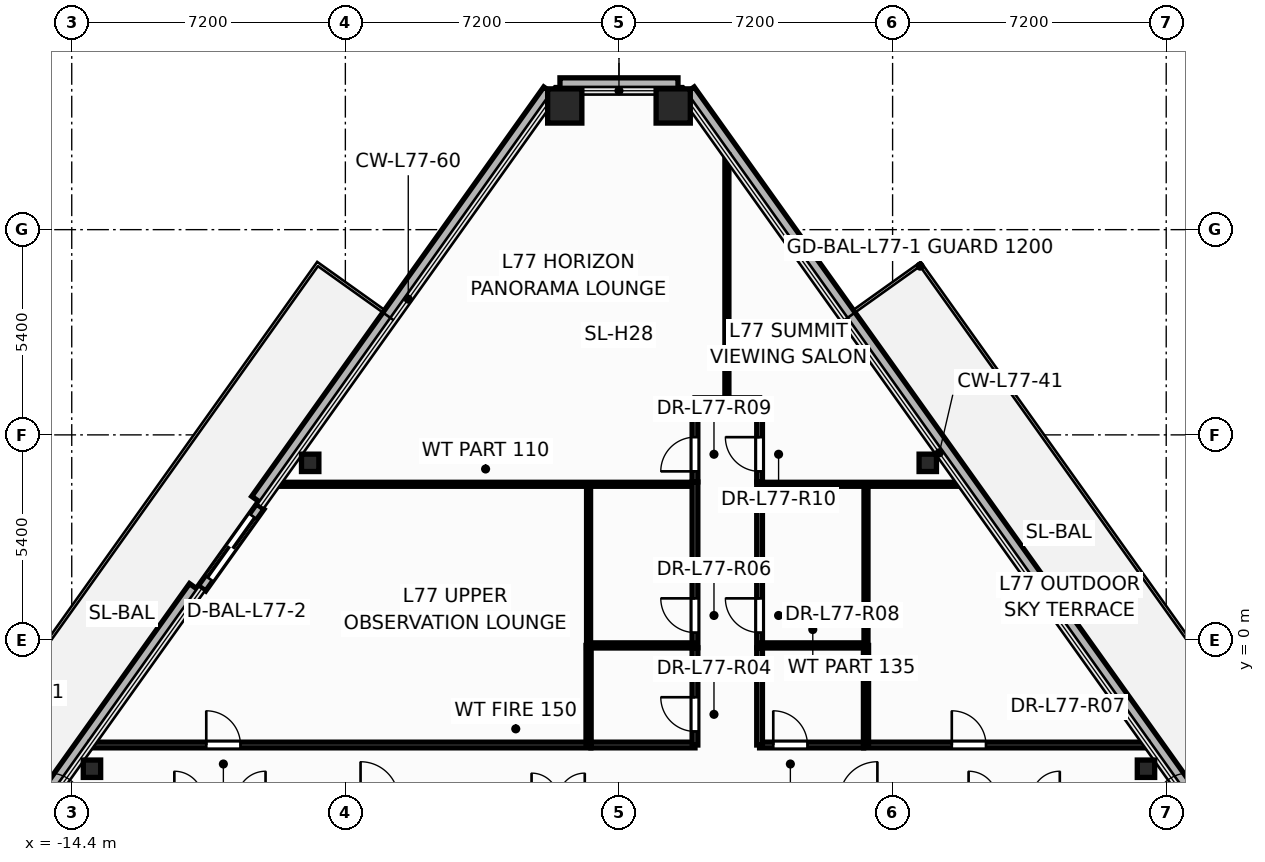
"""IFC4 building model, lengths in metres.
Left out: names, types, materials, properties, quantities, classifications, styles, units other than length and angle.
Written with IfcOpenShell. Run it as: python <this file> out.ifc"""

import sys

from ifc_helpers import new_model, si_unit, direction, frame, frame_2d, origin, origin_2d, place, context, subcontext, project, spatial, rectangle, hollow_rectangle, hollow_circle, extrude, element, fill, save


model = new_model("IFC4")
c1 = context("Model", 3, precision=1e-05, world=origin(), true_north=direction((0.0, 1.0)))
c2 = subcontext(c1, "Body", "Model", "MODEL_VIEW")
j1 = project(units=[si_unit("LENGTHUNIT", "METRE"), si_unit("PLANEANGLEUNIT", "RADIAN")], contexts=[c1])
p1 = place(None, origin())
s1 = spatial("IfcSite", under=j1, at=p1, CompositionType="ELEMENT")
p2 = place(p1, origin())
s2 = spatial("IfcBuilding", under=s1, at=p2, CompositionType="ELEMENT")
p3 = place(p2, frame((0.0, 0.0, 293.4)))
s3 = spatial("IfcBuildingStorey", under=s2, at=p3, CompositionType="ELEMENT", Elevation=293.4)
for number, where, z_axis, x_axis in (
    (1, (1.427, 14.055, 0.0), (0.0, 0.0, 1.0), (1.0, 0.0, 0.0)),
    (2, (-1.427, 14.055, 0.0), (0.0, 0.0, 1.0), (1.0, 0.0, 0.0)),
):
    element("IfcColumn", number, at=place(p3, frame(where, z_axis=z_axis, x_axis=x_axis)), inside=s3, PredefinedType="COLUMN", context=c2, shape_type="SweptSolid", body=[
        extrude(hollow_rectangle(XDim=0.9, YDim=0.9, WallThickness=0.04, at=origin_2d()), origin(), (0.0, 0.0, 1.0), 4.2),
    ])
for number, where, z_axis, x_axis in (
    (3, (13.868, -3.385, 0.0), (0.0, 0.0, 1.0), (1.0, 0.0, 0.0)),
    (4, (8.126, 4.664, 0.0), (0.0, 0.0, 1.0), (1.0, 0.0, 0.0)),
    (5, (-8.126, 4.664, 0.0), (0.0, 0.0, 1.0), (1.0, 0.0, 0.0)),
    (6, (-13.868, -3.385, 0.0), (0.0, 0.0, 1.0), (1.0, 0.0, 0.0)),
):
    element("IfcColumn", number, at=place(p3, frame(where, z_axis=z_axis, x_axis=x_axis)), inside=s3, PredefinedType="COLUMN", context=c2, shape_type="SweptSolid", body=[
        extrude(hollow_circle(Radius=0.229, WallThickness=0.016, at=origin_2d()), origin(), (0.0, 0.0, 1.0), 4.2),
    ])
p4 = place(p3, frame((15.285, -4.406, -0.2), z_axis=(0.0, 0.0, 1.0), x_axis=(-0.580762496963, 0.814073044709, 0.0)))
e7 = element("IfcWall", 7, at=p4, inside=s3, PredefinedType="PARAPET", context=c2, shape_type="SweptSolid", body=[
    extrude(rectangle(XDim=23.163, YDim=0.36, at=frame_2d((11.581, 0.0))), origin(), (0.0, 0.0, 1.0), 0.38),
])
p5 = place(p3, frame((1.553, 14.615, -0.2), z_axis=(0.0, 0.0, 1.0), x_axis=(-1.0, 0.0, 0.0)))
e8 = element("IfcWall", 8, at=p5, inside=s3, PredefinedType="PARAPET", context=c2, shape_type="SweptSolid", body=[
    extrude(rectangle(XDim=3.105, YDim=0.36, at=frame_2d((1.553, 0.0))), origin(), (0.0, 0.0, 1.0), 0.38),
])
p6 = place(p3, frame((-1.833, 14.45, -0.2), z_axis=(0.0, 0.0, 1.0), x_axis=(-0.58075810662, -0.814076176777, 0.0)))
e9 = element("IfcWall", 9, at=p6, inside=s3, PredefinedType="PARAPET", context=c2, shape_type="SweptSolid", body=[
    extrude(rectangle(XDim=13.231, YDim=0.36, at=frame_2d((6.616, 0.0))), origin(), (0.0, 0.0, 1.0), 0.38),
])
p7 = place(p3, frame((-11.155, 1.383, -0.2), z_axis=(0.0, 0.0, 1.0), x_axis=(-0.580765612452, -0.814070822099, 0.0)))
e10 = element("IfcWall", 10, at=p7, inside=s3, PredefinedType="PARAPET", context=c2, shape_type="SweptSolid", body=[
    extrude(rectangle(XDim=17.156, YDim=0.36, at=frame_2d((8.578, 0.0))), origin(), (0.0, 0.0, 1.0), 0.38),
])
p8 = place(p3, frame((-9.439, 3.512, -0.015), z_axis=(0.0, 0.0, 1.0), x_axis=(-0.580756960622, -0.814076994325, 0.0)))
e11 = element("IfcWall", 11, at=p8, inside=s3, PredefinedType="STANDARD", context=c2, shape_type="SweptSolid", body=[
    extrude(rectangle(XDim=2.64, YDim=0.24, at=frame_2d((1.32, 0.0))), origin(), (0.0, 0.0, 1.0), 3.413),
])
p9 = place(p8, frame((0.32, 0.0, 0.015)))
e12 = element("IfcOpeningElement", 12, at=p9, cuts=e11, PredefinedType="OPENING", context=c2, shape_type="SweptSolid", body=[
    extrude(rectangle(XDim=2.006, YDim=2.204, at=frame_2d((1.0, 1.102))), frame((0.0, 0.13, 0.0), z_axis=(0.0, -1.0, 0.0), x_axis=(1.0, 0.0, 0.0)), (0.0, 0.0, 1.0), 0.26),
])
p10 = place(p3, frame((-13.914, -2.76, 0.0), z_axis=(0.0, 0.0, 1.0), x_axis=(1.0, 0.0, 0.0)))
e13 = element("IfcWall", 13, at=p10, inside=s3, PredefinedType="PARTITIONING", context=c2, shape_type="SweptSolid", body=[
    extrude(rectangle(XDim=13.174, YDim=0.15, at=frame_2d((6.587, 0.0))), origin(), (0.0, 0.0, 1.0), 2.855),
])
p11 = place(p10, frame((3.053, 0.0, 0.0)))
e14 = element("IfcOpeningElement", 14, at=p11, cuts=e13, PredefinedType="OPENING", context=c2, shape_type="SweptSolid", body=[
    extrude(rectangle(XDim=0.906, YDim=2.104, at=frame_2d((0.45, 1.052))), frame((0.0, 0.085, 0.0), z_axis=(0.0, -1.0, 0.0), x_axis=(1.0, 0.0, 0.0)), (0.0, 0.0, 1.0), 0.17),
])
p12 = place(p3, frame((-9.02, 4.1, 0.0), z_axis=(0.0, 0.0, 1.0), x_axis=(1.0, 0.0, 0.0)))
e15 = element("IfcWall", 15, at=p12, inside=s3, PredefinedType="PARTITIONING", context=c2, shape_type="SweptSolid", body=[
    extrude(rectangle(XDim=11.02, YDim=0.105, at=frame_2d((5.51, 0.0))), origin(), (0.0, 0.0, 1.0), 2.855),
])
p13 = place(p3, frame((6.44, -2.76, 0.0), z_axis=(0.0, 0.0, 1.0), x_axis=(1.0, 0.0, 0.0)))
e16 = element("IfcWall", 16, at=p13, inside=s3, PredefinedType="PARTITIONING", context=c2, shape_type="SweptSolid", body=[
    extrude(rectangle(XDim=7.474, YDim=0.15, at=frame_2d((3.737, 0.0))), origin(), (0.0, 0.0, 1.0), 2.855),
])
p14 = place(p13, frame((2.318, 0.0, 0.0)))
e17 = element("IfcOpeningElement", 17, at=p14, cuts=e16, PredefinedType="OPENING", context=c2, shape_type="SweptSolid", body=[
    extrude(rectangle(XDim=0.906, YDim=2.104, at=frame_2d((0.45, 1.052))), frame((0.0, 0.085, 0.0), z_axis=(0.0, -1.0, 0.0), x_axis=(1.0, 0.0, 0.0)), (0.0, 0.0, 1.0), 0.17),
])
p15 = place(p3, frame((2.84, 6.3, 0.0), z_axis=(0.0, 0.0, 1.0), x_axis=(0.0, 1.0, 0.0)))
e18 = element("IfcWall", 18, at=p15, inside=s3, PredefinedType="PARTITIONING", context=c2, shape_type="SweptSolid", body=[
    extrude(rectangle(XDim=6.462, YDim=0.105, at=frame_2d((3.231, 0.0))), origin(), (0.0, 0.0, 1.0), 2.855),
])
p16 = place(p3, frame((2.0, -0.2, 0.0), z_axis=(0.0, 0.0, 1.0), x_axis=(0.0, 1.0, 0.0)))
e19 = element("IfcWall", 19, at=p16, inside=s3, PredefinedType="PARTITIONING", context=c2, shape_type="SweptSolid", body=[
    extrude(rectangle(XDim=4.36, YDim=0.15, at=frame_2d((2.18, 0.0))), origin(), (0.0, 0.0, 1.0), 3.88),
])
p17 = place(p16, frame((0.398, 0.0, 0.0)))
e20 = element("IfcOpeningElement", 20, at=p17, cuts=e19, PredefinedType="OPENING", context=c2, shape_type="SweptSolid", body=[
    extrude(rectangle(XDim=0.906, YDim=2.104, at=frame_2d((0.45, 1.052))), frame((0.0, 0.085, 0.0), z_axis=(0.0, -1.0, 0.0), x_axis=(1.0, 0.0, 0.0)), (0.0, 0.0, 1.0), 0.17),
])
p18 = place(p3, frame((3.7, -0.2, 0.0), z_axis=(0.0, 0.0, 1.0), x_axis=(0.0, 1.0, 0.0)))
e21 = element("IfcWall", 21, at=p18, inside=s3, PredefinedType="PARTITIONING", context=c2, shape_type="SweptSolid", body=[
    extrude(rectangle(XDim=4.36, YDim=0.15, at=frame_2d((2.18, 0.0))), origin(), (0.0, 0.0, 1.0), 2.855),
])
p19 = place(p18, frame((0.398, 0.0, 0.0)))
e22 = element("IfcOpeningElement", 22, at=p19, cuts=e21, PredefinedType="OPENING", context=c2, shape_type="SweptSolid", body=[
    extrude(rectangle(XDim=0.906, YDim=2.104, at=frame_2d((0.45, 1.052))), frame((0.0, 0.085, 0.0), z_axis=(0.0, -1.0, 0.0), x_axis=(1.0, 0.0, 0.0)), (0.0, 0.0, 1.0), 0.17),
])
for number, where, z_axis, x_axis in (
    (23, (-0.8, -0.2, 0.0), (0.0, 0.0, 1.0), (0.0, 1.0, 0.0)),
    (24, (6.5, -0.2, 0.0), (0.0, 0.0, 1.0), (0.0, 1.0, 0.0)),
):
    element("IfcWall", number, at=place(p3, frame(where, z_axis=z_axis, x_axis=x_axis)), inside=s3, PredefinedType="PARTITIONING", context=c2, shape_type="SweptSolid", body=[
        extrude(rectangle(XDim=4.3, YDim=0.105, at=frame_2d((2.15, 0.0))), origin(), (0.0, 0.0, 1.0), 2.855),
    ])
p20 = place(p3, frame((-0.738, -2.76, 0.0), z_axis=(0.0, 0.0, 1.0), x_axis=(1.0, 0.0, 0.0)))
e25 = element("IfcWall", 25, at=p20, inside=s3, PredefinedType="PARTITIONING", context=c2, shape_type="SweptSolid", body=[
    extrude(rectangle(XDim=2.738, YDim=0.15, at=frame_2d((1.369, 0.0))), origin(), (0.0, 0.0, 1.0), 2.855),
])
p21 = place(p3, frame((3.7, -2.76, 0.0), z_axis=(0.0, 0.0, 1.0), x_axis=(1.0, 0.0, 0.0)))
e26 = element("IfcWall", 26, at=p21, inside=s3, PredefinedType="PARTITIONING", context=c2, shape_type="SweptSolid", body=[
    extrude(rectangle(XDim=2.738, YDim=0.15, at=frame_2d((1.369, 0.0))), origin(), (0.0, 0.0, 1.0), 3.88),
])
p22 = place(p21, frame((0.36, 0.0, 0.0)))
e27 = element("IfcOpeningElement", 27, at=p22, cuts=e26, PredefinedType="OPENING", context=c2, shape_type="SweptSolid", body=[
    extrude(rectangle(XDim=0.906, YDim=2.104, at=frame_2d((0.45, 1.052))), frame((0.0, 0.085, 0.0), z_axis=(0.0, -1.0, 0.0), x_axis=(1.0, 0.0, 0.0)), (0.0, 0.0, 1.0), 0.17),
])
for number, where, z_axis, x_axis in (
    (28, (3.7, -0.14, 0.0), (0.0, 0.0, 1.0), (1.0, 0.0, 0.0)),
    (29, (-0.8, -0.14, 0.0), (0.0, 0.0, 1.0), (1.0, 0.0, 0.0)),
):
    element("IfcWall", number, at=place(p3, frame(where, z_axis=z_axis, x_axis=x_axis)), inside=s3, PredefinedType="PARTITIONING", context=c2, shape_type="SweptSolid", body=[
        extrude(rectangle(XDim=2.8, YDim=0.135, at=frame_2d((1.4, 0.0))), origin(), (0.0, 0.0, 1.0), 2.855),
    ])
p23 = place(p3, frame((3.7, 4.1, 0.0), z_axis=(0.0, 0.0, 1.0), x_axis=(1.0, 0.0, 0.0)))
e30 = element("IfcWall", 30, at=p23, inside=s3, PredefinedType="PARTITIONING", context=c2, shape_type="SweptSolid", body=[
    extrude(rectangle(XDim=5.32, YDim=0.105, at=frame_2d((2.66, 0.0))), origin(), (0.0, 0.0, 1.0), 2.855),
])
p24 = place(p3, frame((3.7, -2.76, 0.0), z_axis=(0.0, 0.0, 1.0), x_axis=(0.0, 1.0, 0.0)))
e31 = element("IfcWall", 31, at=p24, inside=s3, PredefinedType="PARTITIONING", context=c2, shape_type="SweptSolid", body=[
    extrude(rectangle(XDim=2.558, YDim=0.15, at=frame_2d((1.279, 0.0))), origin(), (0.0, 0.0, 1.0), 2.855),
])
p25 = place(p3, frame((2.0, -2.76, 0.0), z_axis=(0.0, 0.0, 1.0), x_axis=(0.0, 1.0, 0.0)))
e32 = element("IfcWall", 32, at=p25, inside=s3, PredefinedType="PARTITIONING", context=c2, shape_type="SweptSolid", body=[
    extrude(rectangle(XDim=2.558, YDim=0.15, at=frame_2d((1.279, 0.0))), origin(), (0.0, 0.0, 1.0), 2.855),
])
p26 = place(p25, frame((0.357, 0.0, 0.0)))
e33 = element("IfcOpeningElement", 33, at=p26, cuts=e32, PredefinedType="OPENING", context=c2, shape_type="SweptSolid", body=[
    extrude(rectangle(XDim=0.906, YDim=2.104, at=frame_2d((0.45, 1.052))), frame((0.0, 0.085, 0.0), z_axis=(0.0, -1.0, 0.0), x_axis=(1.0, 0.0, 0.0)), (0.0, 0.0, 1.0), 0.17),
])
p27 = place(p3, frame((6.5, -2.76, 0.0), z_axis=(0.0, 0.0, 1.0), x_axis=(0.0, 1.0, 0.0)))
e34 = element("IfcWall", 34, at=p27, inside=s3, PredefinedType="PARTITIONING", context=c2, shape_type="SweptSolid", body=[
    extrude(rectangle(XDim=2.62, YDim=0.135, at=frame_2d((1.31, 0.0))), origin(), (0.0, 0.0, 1.0), 2.855),
])
p28 = place(p3, frame((-0.8, -2.76, 0.0), z_axis=(0.0, 0.0, 1.0), x_axis=(0.0, 1.0, 0.0)))
e35 = element("IfcWall", 35, at=p28, inside=s3, PredefinedType="PARTITIONING", context=c2, shape_type="SweptSolid", body=[
    extrude(rectangle(XDim=2.62, YDim=0.135, at=frame_2d((1.31, 0.0))), origin(), (0.0, 0.0, 1.0), 3.88),
])
p29 = place(p3, frame((2.0, 4.162, 0.0), z_axis=(0.0, 0.0, 1.0), x_axis=(0.0, 1.0, 0.0)))
e36 = element("IfcWall", 36, at=p29, inside=s3, PredefinedType="PARTITIONING", context=c2, shape_type="SweptSolid", body=[
    extrude(rectangle(XDim=2.138, YDim=0.15, at=frame_2d((1.069, 0.0))), origin(), (0.0, 0.0, 1.0), 2.855),
])
p30 = place(p29, frame((0.278, 0.0, 0.0)))
e37 = element("IfcOpeningElement", 37, at=p30, cuts=e36, PredefinedType="OPENING", context=c2, shape_type="SweptSolid", body=[
    extrude(rectangle(XDim=0.906, YDim=2.104, at=frame_2d((0.45, 1.052))), frame((0.0, 0.085, 0.0), z_axis=(0.0, -1.0, 0.0), x_axis=(1.0, 0.0, 0.0)), (0.0, 0.0, 1.0), 0.17),
])
p31 = place(p3, frame((3.7, 4.162, 0.0), z_axis=(0.0, 0.0, 1.0), x_axis=(0.0, 1.0, 0.0)))
e38 = element("IfcWall", 38, at=p31, inside=s3, PredefinedType="PARTITIONING", context=c2, shape_type="SweptSolid", body=[
    extrude(rectangle(XDim=2.138, YDim=0.15, at=frame_2d((1.069, 0.0))), origin(), (0.0, 0.0, 1.0), 2.855),
])
p32 = place(p31, frame((0.278, 0.0, 0.0)))
e39 = element("IfcOpeningElement", 39, at=p32, cuts=e38, PredefinedType="OPENING", context=c2, shape_type="SweptSolid", body=[
    extrude(rectangle(XDim=0.906, YDim=2.104, at=frame_2d((0.45, 1.052))), frame((0.0, 0.085, 0.0), z_axis=(0.0, -1.0, 0.0), x_axis=(1.0, 0.0, 0.0)), (0.0, 0.0, 1.0), 0.17),
])
p33 = place(p3, frame((2.0, 6.3, 0.0), z_axis=(0.0, 0.0, 1.0), x_axis=(1.0, 0.0, 0.0)))
e40 = element("IfcWall", 40, at=p33, inside=s3, PredefinedType="PARTITIONING", context=c2, shape_type="SweptSolid", body=[
    extrude(rectangle(XDim=1.7, YDim=0.15, at=frame_2d((0.85, 0.0))), origin(), (0.0, 0.0, 1.0), 2.855),
])
p34 = place(p9, origin())
e41 = element("IfcDoor", 41, at=p34, inside=s3, OperationType="DOUBLE_DOOR_SLIDING", PredefinedType="DOOR", context=c2, shape_type="SweptSolid", body=[
    extrude(rectangle(XDim=2.0, YDim=2.2, at=frame_2d((1.0, 1.1))), frame((0.0, 0.025, 0.0), z_axis=(0.0, -1.0, 0.0), x_axis=(1.0, 0.0, 0.0)), (0.0, 0.0, 1.0), 0.05),
])
fill(e12, e41)
p35 = place(p22, origin())
e42 = element("IfcDoor", 42, at=p35, inside=s3, OperationType="SINGLE_SWING_LEFT", PredefinedType="DOOR", context=c2, shape_type="SweptSolid", body=[
    extrude(rectangle(XDim=0.9, YDim=2.1, at=frame_2d((0.45, 1.05))), frame((0.0, 0.025, 0.0), z_axis=(0.0, -1.0, 0.0), x_axis=(1.0, 0.0, 0.0)), (0.0, 0.0, 1.0), 0.05),
])
fill(e27, e42)
p36 = place(p26, origin())
e43 = element("IfcDoor", 43, at=p36, inside=s3, OperationType="SINGLE_SWING_RIGHT", PredefinedType="DOOR", context=c2, shape_type="SweptSolid", body=[
    extrude(rectangle(XDim=0.9, YDim=2.1, at=frame_2d((0.45, 1.05))), frame((0.0, 0.025, 0.0), z_axis=(0.0, -1.0, 0.0), x_axis=(1.0, 0.0, 0.0)), (0.0, 0.0, 1.0), 0.05),
])
fill(e33, e43)
p37 = place(p11, origin())
e44 = element("IfcDoor", 44, at=p37, inside=s3, OperationType="SINGLE_SWING_LEFT", PredefinedType="DOOR", context=c2, shape_type="SweptSolid", body=[
    extrude(rectangle(XDim=0.9, YDim=2.1, at=frame_2d((0.45, 1.05))), frame((0.0, 0.025, 0.0), z_axis=(0.0, -1.0, 0.0), x_axis=(1.0, 0.0, 0.0)), (0.0, 0.0, 1.0), 0.05),
])
fill(e14, e44)
p38 = place(p17, origin())
e45 = element("IfcDoor", 45, at=p38, inside=s3, OperationType="SINGLE_SWING_RIGHT", PredefinedType="DOOR", context=c2, shape_type="SweptSolid", body=[
    extrude(rectangle(XDim=0.9, YDim=2.1, at=frame_2d((0.45, 1.05))), frame((0.0, 0.025, 0.0), z_axis=(0.0, -1.0, 0.0), x_axis=(1.0, 0.0, 0.0)), (0.0, 0.0, 1.0), 0.05),
])
fill(e20, e45)
p39 = place(p14, origin())
e46 = element("IfcDoor", 46, at=p39, inside=s3, OperationType="SINGLE_SWING_LEFT", PredefinedType="DOOR", context=c2, shape_type="SweptSolid", body=[
    extrude(rectangle(XDim=0.9, YDim=2.1, at=frame_2d((0.45, 1.05))), frame((0.0, 0.025, 0.0), z_axis=(0.0, -1.0, 0.0), x_axis=(1.0, 0.0, 0.0)), (0.0, 0.0, 1.0), 0.05),
])
fill(e17, e46)
p40 = place(p19, origin())
e47 = element("IfcDoor", 47, at=p40, inside=s3, OperationType="SINGLE_SWING_RIGHT", PredefinedType="DOOR", context=c2, shape_type="SweptSolid", body=[
    extrude(rectangle(XDim=0.9, YDim=2.1, at=frame_2d((0.45, 1.05))), frame((0.0, 0.025, 0.0), z_axis=(0.0, -1.0, 0.0), x_axis=(1.0, 0.0, 0.0)), (0.0, 0.0, 1.0), 0.05),
])
fill(e22, e47)
p41 = place(p30, origin())
e48 = element("IfcDoor", 48, at=p41, inside=s3, OperationType="SINGLE_SWING_LEFT", PredefinedType="DOOR", context=c2, shape_type="SweptSolid", body=[
    extrude(rectangle(XDim=0.9, YDim=2.1, at=frame_2d((0.45, 1.05))), frame((0.0, 0.025, 0.0), z_axis=(0.0, -1.0, 0.0), x_axis=(1.0, 0.0, 0.0)), (0.0, 0.0, 1.0), 0.05),
])
fill(e37, e48)
p42 = place(p32, origin())
e49 = element("IfcDoor", 49, at=p42, inside=s3, OperationType="SINGLE_SWING_RIGHT", PredefinedType="DOOR", context=c2, shape_type="SweptSolid", body=[
    extrude(rectangle(XDim=0.9, YDim=2.1, at=frame_2d((0.45, 1.05))), frame((0.0, 0.025, 0.0), z_axis=(0.0, -1.0, 0.0), x_axis=(1.0, 0.0, 0.0)), (0.0, 0.0, 1.0), 0.05),
])
fill(e39, e49)
save(model, sys.argv[1])
